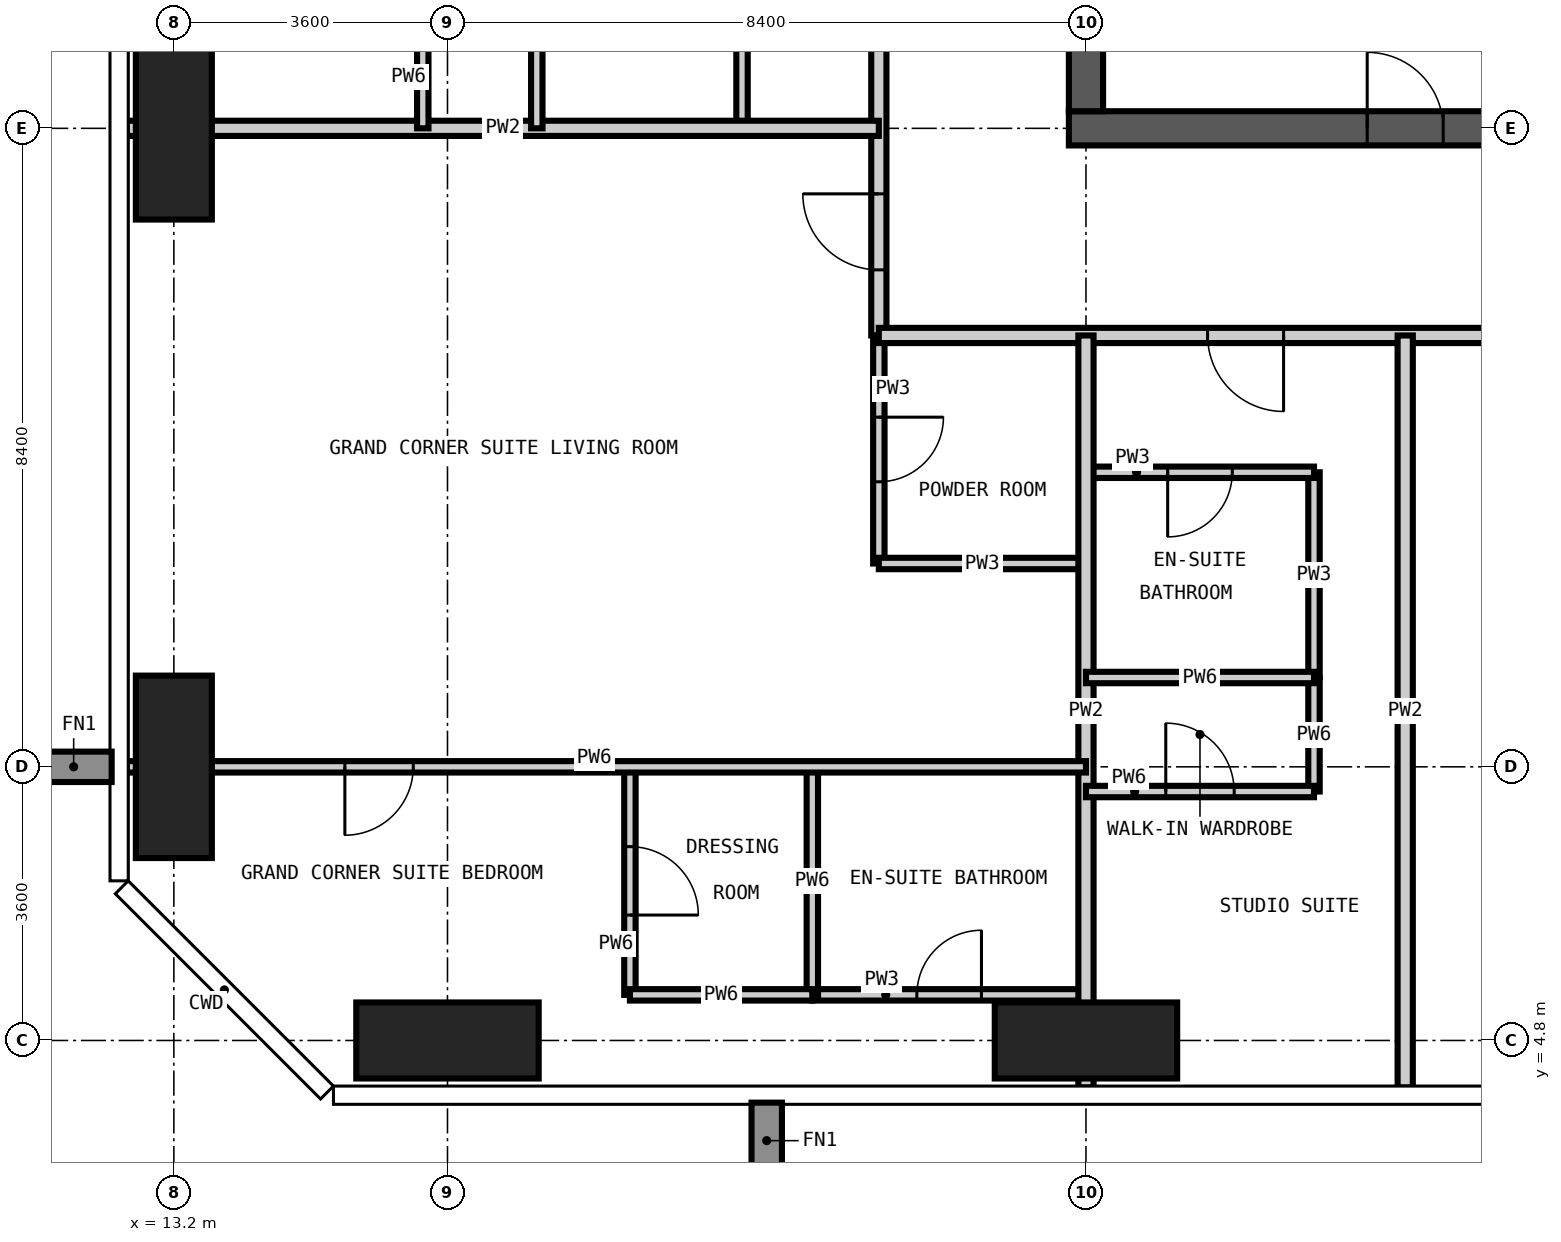
"""IFC4 building model, lengths in metres.
Left out: names, types, materials, properties, quantities, classifications, styles, units other than length and angle.
Written with IfcOpenShell. Run it as: python <this file> out.ifc"""

import sys

from ifc_helpers import new_model, si_unit, direction, frame, frame_2d, origin, origin_2d, place, context, subcontext, project, spatial, rectangle, extrude, element, fill, save


model = new_model("IFC4")
c1 = context("Model", 3, precision=1e-05, world=origin(), true_north=direction((0.0, 1.0)))
c2 = subcontext(c1, "Body", "Model", "MODEL_VIEW")
j1 = project(units=[si_unit("LENGTHUNIT", "METRE"), si_unit("PLANEANGLEUNIT", "RADIAN")], contexts=[c1])
p1 = place(None, origin())
s1 = spatial("IfcSite", under=j1, at=p1, CompositionType="ELEMENT")
p2 = place(p1, origin())
s2 = spatial("IfcBuilding", under=s1, at=p2, CompositionType="ELEMENT")
p3 = place(p2, frame((0.0, 0.0, 264.6)))
s3 = spatial("IfcBuildingStorey", under=s2, at=p3, CompositionType="ELEMENT", Elevation=264.6)
for number, where, z_axis, x_axis in (
    (1, (13.2, 8.4, -0.35), (0.0, 0.0, 1.0), (1.0, 0.0, 0.0)),
    (2, (13.2, 16.8, -0.35), (0.0, 0.0, 1.0), (1.0, 0.0, 0.0)),
):
    element("IfcColumn", number, at=place(p3, frame(where, z_axis=z_axis, x_axis=x_axis)), inside=s3, PredefinedType="COLUMN", context=c2, shape_type="SweptSolid", body=[
        extrude(rectangle(XDim=1.0, YDim=2.4, at=origin_2d()), origin(), (0.0, 0.0, 1.0), 3.9),
    ])
for number, where, z_axis, x_axis in (
    (3, (16.8, 4.8, -0.35), (0.0, 0.0, 1.0), (1.0, 0.0, 0.0)),
    (4, (25.2, 4.8, -0.35), (0.0, 0.0, 1.0), (1.0, 0.0, 0.0)),
):
    element("IfcColumn", number, at=place(p3, frame(where, z_axis=z_axis, x_axis=x_axis)), inside=s3, PredefinedType="COLUMN", context=c2, shape_type="SweptSolid", body=[
        extrude(rectangle(XDim=2.4, YDim=1.0, at=origin_2d()), origin(), (0.0, 0.0, 1.0), 3.9),
    ])
p4 = place(p3, frame((24.975, 16.8, -0.35), z_axis=(0.0, 0.0, 1.0), x_axis=(1.0, 0.0, 0.0)))
e5 = element("IfcWall", 5, at=p4, inside=s3, PredefinedType="SHEAR", context=c2, shape_type="SweptSolid", body=[
    extrude(rectangle(XDim=17.25, YDim=0.45, at=frame_2d((8.625, 0.0))), origin(), (0.0, 0.0, 1.0), 3.9),
])
p5 = place(p4, frame((3.925, 0.0, 0.35)))
e6 = element("IfcOpeningElement", 6, at=p5, cuts=e5, PredefinedType="OPENING", context=c2, shape_type="SweptSolid", body=[
    extrude(rectangle(XDim=1.0, YDim=2.1, at=frame_2d((0.5, 1.05))), frame((0.0, 0.235, 0.0), z_axis=(0.0, -1.0, 0.0), x_axis=(1.0, 0.0, 0.0)), (0.0, 0.0, 1.0), 0.47),
])
p6 = place(p4, frame((10.225, 0.0, 0.35)))
e7 = element("IfcOpeningElement", 7, at=p6, cuts=e5, PredefinedType="OPENING", context=c2, shape_type="SweptSolid", body=[
    extrude(rectangle(XDim=1.0, YDim=2.1, at=frame_2d((0.5, 1.05))), frame((0.0, 0.235, 0.0), z_axis=(0.0, -1.0, 0.0), x_axis=(1.0, 0.0, 0.0)), (0.0, 0.0, 1.0), 0.47),
])
p7 = place(p3, frame((25.2, 41.775, -0.35), z_axis=(0.0, 0.0, 1.0), x_axis=(0.0, -1.0, 0.0)))
e8 = element("IfcWall", 8, at=p7, inside=s3, PredefinedType="SHEAR", context=c2, shape_type="SweptSolid", body=[
    extrude(rectangle(XDim=24.75, YDim=0.45, at=frame_2d((12.375, 0.0))), origin(), (0.0, 0.0, 1.0), 3.9),
])
p8 = place(p7, frame((11.875, 0.0, 0.35)))
e9 = element("IfcOpeningElement", 9, at=p8, cuts=e8, PredefinedType="OPENING", context=c2, shape_type="SweptSolid", body=[
    extrude(rectangle(XDim=1.0, YDim=2.1, at=frame_2d((0.5, 1.05))), frame((0.0, 0.235, 0.0), z_axis=(0.0, -1.0, 0.0), x_axis=(1.0, 0.0, 0.0)), (0.0, 0.0, 1.0), 0.47),
])
p9 = place(p3, frame((20.675, 16.8, 0.0), z_axis=(0.0, 0.0, 1.0), x_axis=(0.0, 1.0, 0.0)))
e10 = element("IfcWall", 10, at=p9, inside=s3, PredefinedType="PARTITIONING", context=c2, shape_type="SweptSolid", body=[
    extrude(rectangle(XDim=3.0, YDim=0.15, at=frame_2d((1.5, 0.0))), origin(), (0.0, 0.0, 1.0), 3.55),
])
p10 = place(p9, frame((1.075, 0.0, 0.0)))
e11 = element("IfcOpeningElement", 11, at=p10, cuts=e10, PredefinedType="OPENING", context=c2, shape_type="SweptSolid", body=[
    extrude(rectangle(XDim=0.85, YDim=2.1, at=frame_2d((0.425, 1.05))), frame((0.0, 0.085, 0.0), z_axis=(0.0, -1.0, 0.0), x_axis=(1.0, 0.0, 0.0)), (0.0, 0.0, 1.0), 0.17),
])
p11 = place(p3, frame((22.475, 11.075, 0.0), z_axis=(0.0, 0.0, 1.0), x_axis=(0.0, 1.0, 0.0)))
e12 = element("IfcWall", 12, at=p11, inside=s3, PredefinedType="PARTITIONING", context=c2, shape_type="SweptSolid", body=[
    extrude(rectangle(XDim=3.0, YDim=0.15, at=frame_2d((1.5, 0.0))), origin(), (0.0, 0.0, 1.0), 3.55),
])
p12 = place(p11, frame((1.075, 0.0, 0.0)))
e13 = element("IfcOpeningElement", 13, at=p12, cuts=e12, PredefinedType="OPENING", context=c2, shape_type="SweptSolid", body=[
    extrude(rectangle(XDim=0.85, YDim=2.1, at=frame_2d((0.425, 1.05))), frame((0.0, 0.085, 0.0), z_axis=(0.0, -1.0, 0.0), x_axis=(1.0, 0.0, 0.0)), (0.0, 0.0, 1.0), 0.17),
])
p13 = place(p3, frame((28.2, 9.575, 0.0), z_axis=(0.0, 0.0, 1.0), x_axis=(0.0, 1.0, 0.0)))
e14 = element("IfcWall", 14, at=p13, inside=s3, PredefinedType="PARTITIONING", context=c2, shape_type="SweptSolid", body=[
    extrude(rectangle(XDim=2.7, YDim=0.15, at=frame_2d((1.35, 0.0))), origin(), (0.0, 0.0, 1.0), 3.55),
])
p14 = place(p3, frame((21.6, 5.4, 0.0), z_axis=(0.0, 0.0, 1.0), x_axis=(1.0, 0.0, 0.0)))
e15 = element("IfcWall", 15, at=p14, inside=s3, PredefinedType="PARTITIONING", context=c2, shape_type="SweptSolid", body=[
    extrude(rectangle(XDim=3.6, YDim=0.15, at=frame_2d((1.8, 0.0))), origin(), (0.0, 0.0, 1.0), 3.55),
])
p15 = place(p14, frame((1.375, 0.0, 0.0)))
e16 = element("IfcOpeningElement", 16, at=p15, cuts=e15, PredefinedType="OPENING", context=c2, shape_type="SweptSolid", body=[
    extrude(rectangle(XDim=0.85, YDim=2.1, at=frame_2d((0.425, 1.05))), frame((0.0, 0.085, 0.0), z_axis=(0.0, -1.0, 0.0), x_axis=(1.0, 0.0, 0.0)), (0.0, 0.0, 1.0), 0.17),
])
p16 = place(p3, frame((22.475, 11.075, 0.0), z_axis=(0.0, 0.0, 1.0), x_axis=(1.0, 0.0, 0.0)))
e17 = element("IfcWall", 17, at=p16, inside=s3, PredefinedType="PARTITIONING", context=c2, shape_type="SweptSolid", body=[
    extrude(rectangle(XDim=2.725, YDim=0.15, at=frame_2d((1.362, 0.0))), origin(), (0.0, 0.0, 1.0), 3.55),
])
p17 = place(p3, frame((25.2, 12.275, 0.0), z_axis=(0.0, 0.0, 1.0), x_axis=(1.0, 0.0, 0.0)))
e18 = element("IfcWall", 18, at=p17, inside=s3, PredefinedType="PARTITIONING", context=c2, shape_type="SweptSolid", body=[
    extrude(rectangle(XDim=3.0, YDim=0.15, at=frame_2d((1.5, 0.0))), origin(), (0.0, 0.0, 1.0), 3.55),
])
p18 = place(p17, frame((1.075, 0.0, 0.0)))
e19 = element("IfcOpeningElement", 19, at=p18, cuts=e18, PredefinedType="OPENING", context=c2, shape_type="SweptSolid", body=[
    extrude(rectangle(XDim=0.85, YDim=2.1, at=frame_2d((0.425, 1.05))), frame((0.0, 0.085, 0.0), z_axis=(0.0, -1.0, 0.0), x_axis=(1.0, 0.0, 0.0)), (0.0, 0.0, 1.0), 0.17),
])
p19 = place(p3, frame((22.475, 14.075, 0.0), z_axis=(0.0, 0.0, 1.0), x_axis=(0.0, 1.0, 0.0)))
e20 = element("IfcWall", 20, at=p19, inside=s3, PredefinedType="PARTITIONING", context=c2, shape_type="SweptSolid", body=[
    extrude(rectangle(XDim=30.05, YDim=0.2, at=frame_2d((15.025, 0.0))), origin(), (0.0, 0.0, 1.0), 3.55),
])
p20 = place(p19, frame((4.325, 0.0, 0.0)))
e21 = element("IfcOpeningElement", 21, at=p20, cuts=e20, PredefinedType="OPENING", context=c2, shape_type="SweptSolid", body=[
    extrude(rectangle(XDim=1.0, YDim=2.2, at=frame_2d((0.5, 1.1))), frame((0.0, 0.11, 0.0), z_axis=(0.0, -1.0, 0.0), x_axis=(1.0, 0.0, 0.0)), (0.0, 0.0, 1.0), 0.22),
])
p21 = place(p19, frame((8.525, 0.0, 0.0)))
e22 = element("IfcOpeningElement", 22, at=p21, cuts=e20, PredefinedType="OPENING", context=c2, shape_type="SweptSolid", body=[
    extrude(rectangle(XDim=1.0, YDim=2.2, at=frame_2d((0.5, 1.1))), frame((0.0, 0.11, 0.0), z_axis=(0.0, -1.0, 0.0), x_axis=(1.0, 0.0, 0.0)), (0.0, 0.0, 1.0), 0.22),
])
p22 = place(p19, frame((13.625, 0.0, 0.0)))
e23 = element("IfcOpeningElement", 23, at=p22, cuts=e20, PredefinedType="OPENING", context=c2, shape_type="SweptSolid", body=[
    extrude(rectangle(XDim=1.0, YDim=2.2, at=frame_2d((0.5, 1.1))), frame((0.0, 0.11, 0.0), z_axis=(0.0, -1.0, 0.0), x_axis=(1.0, 0.0, 0.0)), (0.0, 0.0, 1.0), 0.22),
])
p23 = place(p19, frame((25.325, 0.0, 0.0)))
e24 = element("IfcOpeningElement", 24, at=p23, cuts=e20, PredefinedType="OPENING", context=c2, shape_type="SweptSolid", body=[
    extrude(rectangle(XDim=1.0, YDim=2.2, at=frame_2d((0.5, 1.1))), frame((0.0, 0.11, 0.0), z_axis=(0.0, -1.0, 0.0), x_axis=(1.0, 0.0, 0.0)), (0.0, 0.0, 1.0), 0.22),
])
p24 = place(p19, frame((0.863, 0.0, 0.0)))
e25 = element("IfcOpeningElement", 25, at=p24, cuts=e20, PredefinedType="OPENING", context=c2, shape_type="SweptSolid", body=[
    extrude(rectangle(XDim=1.0, YDim=2.2, at=frame_2d((0.5, 1.1))), frame((0.0, 0.11, 0.0), z_axis=(0.0, -1.0, 0.0), x_axis=(1.0, 0.0, 0.0)), (0.0, 0.0, 1.0), 0.22),
])
p25 = place(p19, frame((28.487, 0.0, 0.0)))
e26 = element("IfcOpeningElement", 26, at=p25, cuts=e20, PredefinedType="OPENING", context=c2, shape_type="SweptSolid", body=[
    extrude(rectangle(XDim=1.0, YDim=2.2, at=frame_2d((0.5, 1.1))), frame((0.0, 0.11, 0.0), z_axis=(0.0, -1.0, 0.0), x_axis=(1.0, 0.0, 0.0)), (0.0, 0.0, 1.0), 0.22),
])
p26 = place(p3, frame((45.325, 14.075, 0.0), z_axis=(0.0, 0.0, 1.0), x_axis=(-1.0, 0.0, 0.0)))
e27 = element("IfcWall", 27, at=p26, inside=s3, PredefinedType="PARTITIONING", context=c2, shape_type="SweptSolid", body=[
    extrude(rectangle(XDim=22.85, YDim=0.2, at=frame_2d((11.425, 0.0))), origin(), (0.0, 0.0, 1.0), 3.55),
])
p27 = place(p26, frame((17.525, 0.0, 0.0)))
e28 = element("IfcOpeningElement", 28, at=p27, cuts=e27, PredefinedType="OPENING", context=c2, shape_type="SweptSolid", body=[
    extrude(rectangle(XDim=1.0, YDim=2.2, at=frame_2d((0.5, 1.1))), frame((0.0, 0.11, 0.0), z_axis=(0.0, -1.0, 0.0), x_axis=(1.0, 0.0, 0.0)), (0.0, 0.0, 1.0), 0.22),
])
p28 = place(p26, frame((11.225, 0.0, 0.0)))
e29 = element("IfcOpeningElement", 29, at=p28, cuts=e27, PredefinedType="OPENING", context=c2, shape_type="SweptSolid", body=[
    extrude(rectangle(XDim=1.0, YDim=2.2, at=frame_2d((0.5, 1.1))), frame((0.0, 0.11, 0.0), z_axis=(0.0, -1.0, 0.0), x_axis=(1.0, 0.0, 0.0)), (0.0, 0.0, 1.0), 0.22),
])
p29 = place(p26, frame((4.925, 0.0, 0.0)))
e30 = element("IfcOpeningElement", 30, at=p29, cuts=e27, PredefinedType="OPENING", context=c2, shape_type="SweptSolid", body=[
    extrude(rectangle(XDim=1.0, YDim=2.2, at=frame_2d((0.5, 1.1))), frame((0.0, 0.11, 0.0), z_axis=(0.0, -1.0, 0.0), x_axis=(1.0, 0.0, 0.0)), (0.0, 0.0, 1.0), 0.22),
])
for number, where, z_axis, x_axis in (
    (31, (25.2, 4.182, 0.0), (0.0, 0.0, 1.0), (0.0, 1.0, 0.0)),
    (32, (29.4, 4.182, 0.0), (0.0, 0.0, 1.0), (0.0, 1.0, 0.0)),
    (33, (12.582, 16.8, 0.0), (0.0, 0.0, 1.0), (1.0, 0.0, 0.0)),
):
    element("IfcWall", number, at=place(p3, frame(where, z_axis=z_axis, x_axis=x_axis)), inside=s3, PredefinedType="PARTITIONING", context=c2, shape_type="SweptSolid", body=[
        extrude(rectangle(XDim=9.893, YDim=0.2, at=frame_2d((4.947, 0.0))), origin(), (0.0, 0.0, 1.0), 3.55),
    ])
p30 = place(p3, frame((16.475, 16.8, 0.0), z_axis=(0.0, 0.0, 1.0), x_axis=(0.0, 1.0, 0.0)))
e34 = element("IfcWall", 34, at=p30, inside=s3, PredefinedType="PARTITIONING", context=c2, shape_type="SweptSolid", body=[
    extrude(rectangle(XDim=3.0, YDim=0.15, at=frame_2d((1.5, 0.0))), origin(), (0.0, 0.0, 1.0), 3.55),
])
p31 = place(p30, frame((1.05, 0.0, 0.0)))
e35 = element("IfcOpeningElement", 35, at=p31, cuts=e34, PredefinedType="OPENING", context=c2, shape_type="SweptSolid", body=[
    extrude(rectangle(XDim=0.9, YDim=2.1, at=frame_2d((0.45, 1.05))), frame((0.0, 0.085, 0.0), z_axis=(0.0, -1.0, 0.0), x_axis=(1.0, 0.0, 0.0)), (0.0, 0.0, 1.0), 0.17),
])
p32 = place(p3, frame((17.975, 16.8, 0.0), z_axis=(0.0, 0.0, 1.0), x_axis=(0.0, 1.0, 0.0)))
e36 = element("IfcWall", 36, at=p32, inside=s3, PredefinedType="PARTITIONING", context=c2, shape_type="SweptSolid", body=[
    extrude(rectangle(XDim=3.0, YDim=0.15, at=frame_2d((1.5, 0.0))), origin(), (0.0, 0.0, 1.0), 3.55),
])
p33 = place(p3, frame((19.2, 5.4, 0.0), z_axis=(0.0, 0.0, 1.0), x_axis=(0.0, 1.0, 0.0)))
e37 = element("IfcWall", 37, at=p33, inside=s3, PredefinedType="PARTITIONING", context=c2, shape_type="SweptSolid", body=[
    extrude(rectangle(XDim=3.0, YDim=0.15, at=frame_2d((1.5, 0.0))), origin(), (0.0, 0.0, 1.0), 3.55),
])
p34 = place(p33, frame((1.05, 0.0, 0.0)))
e38 = element("IfcOpeningElement", 38, at=p34, cuts=e37, PredefinedType="OPENING", context=c2, shape_type="SweptSolid", body=[
    extrude(rectangle(XDim=0.9, YDim=2.1, at=frame_2d((0.45, 1.05))), frame((0.0, 0.085, 0.0), z_axis=(0.0, -1.0, 0.0), x_axis=(1.0, 0.0, 0.0)), (0.0, 0.0, 1.0), 0.17),
])
p35 = place(p3, frame((21.6, 5.4, 0.0), z_axis=(0.0, 0.0, 1.0), x_axis=(0.0, 1.0, 0.0)))
e39 = element("IfcWall", 39, at=p35, inside=s3, PredefinedType="PARTITIONING", context=c2, shape_type="SweptSolid", body=[
    extrude(rectangle(XDim=3.0, YDim=0.15, at=frame_2d((1.5, 0.0))), origin(), (0.0, 0.0, 1.0), 3.55),
])
p36 = place(p3, frame((28.2, 8.075, 0.0), z_axis=(0.0, 0.0, 1.0), x_axis=(0.0, 1.0, 0.0)))
e40 = element("IfcWall", 40, at=p36, inside=s3, PredefinedType="PARTITIONING", context=c2, shape_type="SweptSolid", body=[
    extrude(rectangle(XDim=1.5, YDim=0.15, at=frame_2d((0.75, 0.0))), origin(), (0.0, 0.0, 1.0), 3.55),
])
p37 = place(p3, frame((19.2, 5.4, 0.0), z_axis=(0.0, 0.0, 1.0), x_axis=(1.0, 0.0, 0.0)))
e41 = element("IfcWall", 41, at=p37, inside=s3, PredefinedType="PARTITIONING", context=c2, shape_type="SweptSolid", body=[
    extrude(rectangle(XDim=2.4, YDim=0.15, at=frame_2d((1.2, 0.0))), origin(), (0.0, 0.0, 1.0), 3.55),
])
p38 = place(p3, frame((25.2, 8.075, 0.0), z_axis=(0.0, 0.0, 1.0), x_axis=(1.0, 0.0, 0.0)))
e42 = element("IfcWall", 42, at=p38, inside=s3, PredefinedType="PARTITIONING", context=c2, shape_type="SweptSolid", body=[
    extrude(rectangle(XDim=3.0, YDim=0.15, at=frame_2d((1.5, 0.0))), origin(), (0.0, 0.0, 1.0), 3.55),
])
p39 = place(p38, frame((1.05, 0.0, 0.0)))
e43 = element("IfcOpeningElement", 43, at=p39, cuts=e42, PredefinedType="OPENING", context=c2, shape_type="SweptSolid", body=[
    extrude(rectangle(XDim=0.9, YDim=2.1, at=frame_2d((0.45, 1.05))), frame((0.0, 0.085, 0.0), z_axis=(0.0, -1.0, 0.0), x_axis=(1.0, 0.0, 0.0)), (0.0, 0.0, 1.0), 0.17),
])
p40 = place(p3, frame((12.582, 8.4, 0.0), z_axis=(0.0, 0.0, 1.0), x_axis=(1.0, 0.0, 0.0)))
e44 = element("IfcWall", 44, at=p40, inside=s3, PredefinedType="PARTITIONING", context=c2, shape_type="SweptSolid", body=[
    extrude(rectangle(XDim=12.618, YDim=0.15, at=frame_2d((6.309, 0.0))), origin(), (0.0, 0.0, 1.0), 3.55),
])
p41 = place(p40, frame((2.868, 0.0, 0.0)))
e45 = element("IfcOpeningElement", 45, at=p41, cuts=e44, PredefinedType="OPENING", context=c2, shape_type="SweptSolid", body=[
    extrude(rectangle(XDim=0.9, YDim=2.1, at=frame_2d((0.45, 1.05))), frame((0.0, 0.085, 0.0), z_axis=(0.0, -1.0, 0.0), x_axis=(1.0, 0.0, 0.0)), (0.0, 0.0, 1.0), 0.17),
])
p42 = place(p3, frame((25.2, 9.575, 0.0), z_axis=(0.0, 0.0, 1.0), x_axis=(1.0, 0.0, 0.0)))
e46 = element("IfcWall", 46, at=p42, inside=s3, PredefinedType="PARTITIONING", context=c2, shape_type="SweptSolid", body=[
    extrude(rectangle(XDim=3.0, YDim=0.15, at=frame_2d((1.5, 0.0))), origin(), (0.0, 0.0, 1.0), 3.55),
])
p43 = place(p27, origin())
e47 = element("IfcDoor", 47, at=p43, inside=s3, OperationType="SINGLE_SWING_LEFT", PredefinedType="DOOR", context=c2, shape_type="SweptSolid", body=[
    extrude(rectangle(XDim=1.0, YDim=2.2, at=frame_2d((0.5, 1.1))), frame((0.0, 0.025, 0.0), z_axis=(0.0, -1.0, 0.0), x_axis=(1.0, 0.0, 0.0)), (0.0, 0.0, 1.0), 0.05),
])
fill(e28, e47)
p44 = place(p18, frame((0.85, 0.0, 0.0), z_axis=(0.0, 0.0, 1.0), x_axis=(-1.0, 0.0, 0.0)))
e48 = element("IfcDoor", 48, at=p44, inside=s3, OperationType="SINGLE_SWING_RIGHT", PredefinedType="DOOR", context=c2, shape_type="SweptSolid", body=[
    extrude(rectangle(XDim=0.85, YDim=2.1, at=frame_2d((0.425, 1.05))), frame((0.0, 0.025, 0.0), z_axis=(0.0, -1.0, 0.0), x_axis=(1.0, 0.0, 0.0)), (0.0, 0.0, 1.0), 0.05),
])
fill(e19, e48)
p45 = place(p39, origin())
e49 = element("IfcDoor", 49, at=p45, inside=s3, OperationType="SINGLE_SWING_LEFT", PredefinedType="DOOR", context=c2, shape_type="SweptSolid", body=[
    extrude(rectangle(XDim=0.9, YDim=2.1, at=frame_2d((0.45, 1.05))), frame((0.0, 0.025, 0.0), z_axis=(0.0, -1.0, 0.0), x_axis=(1.0, 0.0, 0.0)), (0.0, 0.0, 1.0), 0.05),
])
fill(e43, e49)
p46 = place(p24, origin())
e50 = element("IfcDoor", 50, at=p46, inside=s3, OperationType="SINGLE_SWING_RIGHT", PredefinedType="DOOR", context=c2, shape_type="SweptSolid", body=[
    extrude(rectangle(XDim=1.0, YDim=2.2, at=frame_2d((0.5, 1.1))), frame((0.0, 0.025, 0.0), z_axis=(0.0, -1.0, 0.0), x_axis=(1.0, 0.0, 0.0)), (0.0, 0.0, 1.0), 0.05),
])
fill(e25, e50)
p47 = place(p12, frame((0.85, 0.0, 0.0), z_axis=(0.0, 0.0, 1.0), x_axis=(-1.0, 0.0, 0.0)))
e51 = element("IfcDoor", 51, at=p47, inside=s3, OperationType="SINGLE_SWING_LEFT", PredefinedType="DOOR", context=c2, shape_type="SweptSolid", body=[
    extrude(rectangle(XDim=0.85, YDim=2.1, at=frame_2d((0.425, 1.05))), frame((0.0, 0.025, 0.0), z_axis=(0.0, -1.0, 0.0), x_axis=(1.0, 0.0, 0.0)), (0.0, 0.0, 1.0), 0.05),
])
fill(e13, e51)
p48 = place(p41, frame((0.9, 0.0, 0.0), z_axis=(0.0, 0.0, 1.0), x_axis=(-1.0, 0.0, 0.0)))
e52 = element("IfcDoor", 52, at=p48, inside=s3, OperationType="SINGLE_SWING_RIGHT", PredefinedType="DOOR", context=c2, shape_type="SweptSolid", body=[
    extrude(rectangle(XDim=0.9, YDim=2.1, at=frame_2d((0.45, 1.05))), frame((0.0, 0.025, 0.0), z_axis=(0.0, -1.0, 0.0), x_axis=(1.0, 0.0, 0.0)), (0.0, 0.0, 1.0), 0.05),
])
fill(e45, e52)
p49 = place(p15, origin())
e53 = element("IfcDoor", 53, at=p49, inside=s3, OperationType="SINGLE_SWING_RIGHT", PredefinedType="DOOR", context=c2, shape_type="SweptSolid", body=[
    extrude(rectangle(XDim=0.85, YDim=2.1, at=frame_2d((0.425, 1.05))), frame((0.0, 0.025, 0.0), z_axis=(0.0, -1.0, 0.0), x_axis=(1.0, 0.0, 0.0)), (0.0, 0.0, 1.0), 0.05),
])
fill(e16, e53)
p50 = place(p34, frame((0.9, 0.0, 0.0), z_axis=(0.0, 0.0, 1.0), x_axis=(-1.0, 0.0, 0.0)))
e54 = element("IfcDoor", 54, at=p50, inside=s3, OperationType="SINGLE_SWING_RIGHT", PredefinedType="DOOR", context=c2, shape_type="SweptSolid", body=[
    extrude(rectangle(XDim=0.9, YDim=2.1, at=frame_2d((0.45, 1.05))), frame((0.0, 0.025, 0.0), z_axis=(0.0, -1.0, 0.0), x_axis=(1.0, 0.0, 0.0)), (0.0, 0.0, 1.0), 0.05),
])
fill(e38, e54)
p51 = place(p5, origin())
e55 = element("IfcDoor", 55, at=p51, inside=s3, OperationType="SINGLE_SWING_LEFT", PredefinedType="DOOR", context=c2, shape_type="SweptSolid", body=[
    extrude(rectangle(XDim=1.0, YDim=2.1, at=frame_2d((0.5, 1.05))), frame((0.0, 0.025, 0.0), z_axis=(0.0, -1.0, 0.0), x_axis=(1.0, 0.0, 0.0)), (0.0, 0.0, 1.0), 0.05),
])
fill(e6, e55)
save(model, sys.argv[1])
